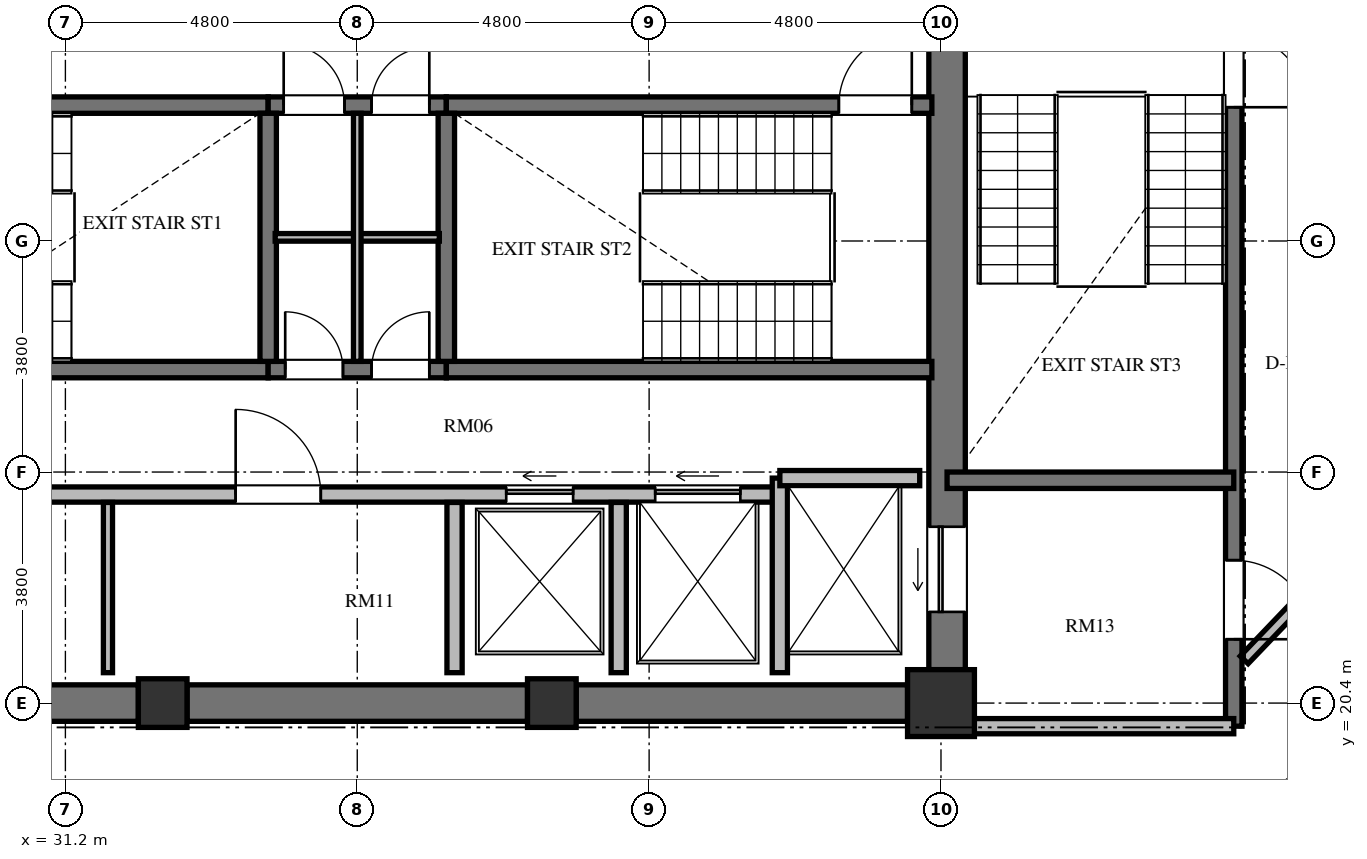
"""IFC4 building model, lengths in metres.
Left out: names, types, materials, properties, quantities, classifications, styles, units other than length and angle.
Written with IfcOpenShell. Run it as: python <this file> out.ifc"""

import sys

from ifc_helpers import new_model, si_unit, direction, frame, frame_2d, origin, origin_2d, place, context, subcontext, project, spatial, rectangle, extrude, element, fill, save


model = new_model("IFC4")
c1 = context("Model", 3, precision=1e-05, world=origin(), true_north=direction((0.0, 1.0)))
c2 = subcontext(c1, "Body", "Model", "MODEL_VIEW")
j1 = project(units=[si_unit("LENGTHUNIT", "METRE"), si_unit("PLANEANGLEUNIT", "RADIAN")], contexts=[c1])
p1 = place(None, origin())
s1 = spatial("IfcSite", under=j1, at=p1, CompositionType="ELEMENT")
p2 = place(p1, origin())
s2 = spatial("IfcBuilding", under=s1, at=p2, CompositionType="ELEMENT")
p3 = place(p2, frame((0.0, 0.0, 213.072)))
s3 = spatial("IfcBuildingStorey", under=s2, at=p3, CompositionType="ELEMENT", Elevation=213.072)
for number, where, z_axis, x_axis in (
    (1, (32.8, 20.4, 0.0), (0.0, 0.0, 1.0), (1.0, 0.0, 0.0)),
    (2, (39.2, 20.4, 0.0), (0.0, 0.0, 1.0), (1.0, 0.0, 0.0)),
):
    element("IfcColumn", number, at=place(p3, frame(where, z_axis=z_axis, x_axis=x_axis)), inside=s3, PredefinedType="COLUMN", context=c2, shape_type="SweptSolid", body=[
        extrude(rectangle(XDim=0.8, YDim=0.8, at=origin_2d()), origin(), (0.0, 0.0, 1.0), 3.648),
    ])
p4 = place(p3, frame((45.6, 20.4, 0.0), z_axis=(0.0, 0.0, 1.0), x_axis=(1.0, 0.0, 0.0)))
e3 = element("IfcColumn", 3, at=p4, inside=s3, PredefinedType="COLUMN", context=c2, shape_type="SweptSolid", body=[
    extrude(rectangle(XDim=1.1, YDim=1.1, at=origin_2d()), origin(), (0.0, 0.0, 1.0), 3.648),
])
p5 = place(p3, frame((45.7, 20.95, 0.0), z_axis=(0.0, 0.0, 1.0), x_axis=(0.0, 1.0, 0.0)))
e4 = element("IfcWall", 4, at=p5, inside=s3, PredefinedType="SHEAR", context=c2, shape_type="SweptSolid", body=[
    extrude(rectangle(XDim=14.1, YDim=0.6, at=frame_2d((7.05, 0.0))), origin(), (0.0, 0.0, 1.0), 3.648),
])
p6 = place(p5, frame((11.75, 0.0, 0.0)))
e5 = element("IfcOpeningElement", 5, at=p6, cuts=e4, PredefinedType="OPENING", context=c2, shape_type="SweptSolid", body=[
    extrude(rectangle(XDim=1.4, YDim=2.3, at=frame_2d((0.7, 1.15))), frame((0.0, 0.31, 0.0), z_axis=(0.0, -1.0, 0.0), x_axis=(1.0, 0.0, 0.0)), (0.0, 0.0, 1.0), 0.62),
])
p7 = place(p5, frame((0.95, 0.0, 0.0)))
e6 = element("IfcOpeningElement", 6, at=p7, cuts=e4, PredefinedType="OPENING", context=c2, shape_type="SweptSolid", body=[
    extrude(rectangle(XDim=1.4, YDim=2.3, at=frame_2d((0.7, 1.15))), frame((0.0, 0.31, 0.0), z_axis=(0.0, -1.0, 0.0), x_axis=(1.0, 0.0, 0.0)), (0.0, 0.0, 1.0), 0.62),
])
p8 = place(p3, frame((26.95, 20.4, 0.0), z_axis=(0.0, 0.0, 1.0), x_axis=(1.0, 0.0, 0.0)))
e7 = element("IfcWall", 7, at=p8, inside=s3, PredefinedType="SHEAR", context=c2, shape_type="SweptSolid", body=[
    extrude(rectangle(XDim=5.45, YDim=0.6, at=frame_2d((2.725, 0.0))), origin(), (0.0, 0.0, 1.0), 3.648),
])
p9 = place(p3, frame((33.2, 20.4, 0.0), z_axis=(0.0, 0.0, 1.0), x_axis=(1.0, 0.0, 0.0)))
e8 = element("IfcWall", 8, at=p9, inside=s3, PredefinedType="SHEAR", context=c2, shape_type="SweptSolid", body=[
    extrude(rectangle(XDim=5.6, YDim=0.6, at=frame_2d((2.8, 0.0))), origin(), (0.0, 0.0, 1.0), 3.648),
])
p10 = place(p3, frame((39.6, 20.4, 0.0), z_axis=(0.0, 0.0, 1.0), x_axis=(1.0, 0.0, 0.0)))
e9 = element("IfcWall", 9, at=p10, inside=s3, PredefinedType="SHEAR", context=c2, shape_type="SweptSolid", body=[
    extrude(rectangle(XDim=5.45, YDim=0.6, at=frame_2d((2.725, 0.0))), origin(), (0.0, 0.0, 1.0), 3.648),
])
p11 = place(p3, frame((26.55, 30.235, 0.0), z_axis=(0.0, 0.0, 1.0), x_axis=(1.0, 0.0, 0.0)))
e10 = element("IfcWall", 10, at=p11, inside=s3, PredefinedType="SHEAR", context=c2, shape_type="SweptSolid", body=[
    extrude(rectangle(XDim=7.985, YDim=0.27, at=frame_2d((3.992, 0.0))), origin(), (0.0, 0.0, 1.0), 3.648),
])
p12 = place(p3, frame((34.535, 30.235, 0.0), z_axis=(0.0, 0.0, 1.0), x_axis=(1.0, 0.0, 0.0)))
e11 = element("IfcWall", 11, at=p12, inside=s3, PredefinedType="SHEAR", context=c2, shape_type="SweptSolid", body=[
    extrude(rectangle(XDim=2.93, YDim=0.27, at=frame_2d((1.465, 0.0))), origin(), (0.0, 0.0, 1.0), 3.648),
])
p13 = place(p12, frame((0.255, 0.0, 0.0)))
e12 = element("IfcOpeningElement", 12, at=p13, cuts=e11, PredefinedType="OPENING", context=c2, shape_type="SweptSolid", body=[
    extrude(rectangle(XDim=1.0, YDim=2.1, at=frame_2d((0.5, 1.05))), frame((0.0, 0.145, 0.0), z_axis=(0.0, -1.0, 0.0), x_axis=(1.0, 0.0, 0.0)), (0.0, 0.0, 1.0), 0.29),
])
p14 = place(p12, frame((1.7, 0.0, 0.0)))
e13 = element("IfcOpeningElement", 13, at=p14, cuts=e11, PredefinedType="OPENING", context=c2, shape_type="SweptSolid", body=[
    extrude(rectangle(XDim=0.95, YDim=2.1, at=frame_2d((0.475, 1.05))), frame((0.0, 0.145, 0.0), z_axis=(0.0, -1.0, 0.0), x_axis=(1.0, 0.0, 0.0)), (0.0, 0.0, 1.0), 0.29),
])
p15 = place(p3, frame((37.465, 30.235, 0.0), z_axis=(0.0, 0.0, 1.0), x_axis=(1.0, 0.0, 0.0)))
e14 = element("IfcWall", 14, at=p15, inside=s3, PredefinedType="SHEAR", context=c2, shape_type="SweptSolid", body=[
    extrude(rectangle(XDim=7.985, YDim=0.27, at=frame_2d((3.992, 0.0))), origin(), (0.0, 0.0, 1.0), 3.648),
])
p16 = place(p15, frame((6.455, 0.0, 0.0)))
e15 = element("IfcOpeningElement", 15, at=p16, cuts=e14, PredefinedType="OPENING", context=c2, shape_type="SweptSolid", body=[
    extrude(rectangle(XDim=1.2, YDim=2.15, at=frame_2d((0.6, 1.075))), frame((0.0, 0.145, 0.0), z_axis=(0.0, -1.0, 0.0), x_axis=(1.0, 0.0, 0.0)), (0.0, 0.0, 1.0), 0.29),
])
p17 = place(p3, frame((26.55, 25.885, 0.0), z_axis=(0.0, 0.0, 1.0), x_axis=(1.0, 0.0, 0.0)))
e16 = element("IfcWall", 16, at=p17, inside=s3, PredefinedType="SHEAR", context=c2, shape_type="SweptSolid", body=[
    extrude(rectangle(XDim=7.985, YDim=0.27, at=frame_2d((3.992, 0.0))), origin(), (0.0, 0.0, 1.0), 3.648),
])
p18 = place(p3, frame((34.535, 25.885, 0.0), z_axis=(0.0, 0.0, 1.0), x_axis=(1.0, 0.0, 0.0)))
e17 = element("IfcWall", 17, at=p18, inside=s3, PredefinedType="SHEAR", context=c2, shape_type="SweptSolid", body=[
    extrude(rectangle(XDim=2.93, YDim=0.27, at=frame_2d((1.465, 0.0))), origin(), (0.0, 0.0, 1.0), 3.648),
])
p19 = place(p18, frame((0.28, 0.0, 0.0)))
e18 = element("IfcOpeningElement", 18, at=p19, cuts=e17, PredefinedType="OPENING", context=c2, shape_type="SweptSolid", body=[
    extrude(rectangle(XDim=0.95, YDim=2.1, at=frame_2d((0.475, 1.05))), frame((0.0, 0.145, 0.0), z_axis=(0.0, -1.0, 0.0), x_axis=(1.0, 0.0, 0.0)), (0.0, 0.0, 1.0), 0.29),
])
p20 = place(p18, frame((1.7, 0.0, 0.0)))
e19 = element("IfcOpeningElement", 19, at=p20, cuts=e17, PredefinedType="OPENING", context=c2, shape_type="SweptSolid", body=[
    extrude(rectangle(XDim=0.95, YDim=2.1, at=frame_2d((0.475, 1.05))), frame((0.0, 0.145, 0.0), z_axis=(0.0, -1.0, 0.0), x_axis=(1.0, 0.0, 0.0)), (0.0, 0.0, 1.0), 0.29),
])
p21 = place(p3, frame((37.465, 25.885, 0.0), z_axis=(0.0, 0.0, 1.0), x_axis=(1.0, 0.0, 0.0)))
e20 = element("IfcWall", 20, at=p21, inside=s3, PredefinedType="SHEAR", context=c2, shape_type="SweptSolid", body=[
    extrude(rectangle(XDim=7.985, YDim=0.27, at=frame_2d((3.992, 0.0))), origin(), (0.0, 0.0, 1.0), 3.648),
])
for number, where, z_axis, x_axis in (
    (21, (34.535, 26.02, 0.0), (0.0, 0.0, 1.0), (0.0, 1.0, 0.0)),
    (22, (37.465, 26.02, 0.0), (0.0, 0.0, 1.0), (0.0, 1.0, 0.0)),
):
    element("IfcWall", number, at=place(p3, frame(where, z_axis=z_axis, x_axis=x_axis)), inside=s3, PredefinedType="SHEAR", context=c2, shape_type="SweptSolid", body=[
        extrude(rectangle(XDim=4.08, YDim=0.27, at=frame_2d((2.04, 0.0))), origin(), (0.0, 0.0, 1.0), 3.648),
    ])
p22 = place(p3, frame((34.65, 28.06, 0.0), z_axis=(0.0, 0.0, 1.0), x_axis=(1.0, 0.0, 0.0)))
e23 = element("IfcWall", 23, at=p22, inside=s3, PredefinedType="PARTITIONING", context=c2, shape_type="SweptSolid", body=[
    extrude(rectangle(XDim=2.7, YDim=0.125, at=frame_2d((1.35, 0.0))), origin(), (0.0, 0.0, 1.0), 3.448),
])
p23 = place(p3, frame((36.0, 26.02, 0.0), z_axis=(0.0, 0.0, 1.0), x_axis=(0.0, 1.0, 0.0)))
e24 = element("IfcWall", 24, at=p23, inside=s3, PredefinedType="PARTITIONING", context=c2, shape_type="SweptSolid", body=[
    extrude(rectangle(XDim=4.08, YDim=0.125, at=frame_2d((2.04, 0.0))), origin(), (0.0, 0.0, 1.0), 3.448),
])
p24 = place(p3, frame((26.75, 23.83, 0.0), z_axis=(0.0, 0.0, 1.0), x_axis=(1.0, 0.0, 0.0)))
e25 = element("IfcWall", 25, at=p24, inside=s3, PredefinedType="SOLIDWALL", context=c2, shape_type="SweptSolid", body=[
    extrude(rectangle(XDim=16.2, YDim=0.25, at=frame_2d((8.1, 0.0))), origin(), (0.0, 0.0, 1.0), 3.448),
])
p25 = place(p24, frame((2.025, 0.0, 0.0)))
e26 = element("IfcOpeningElement", 26, at=p25, cuts=e25, PredefinedType="OPENING", context=c2, shape_type="SweptSolid", body=[
    extrude(rectangle(XDim=1.05, YDim=2.15, at=frame_2d((0.525, 1.075))), frame((0.0, 0.135, 0.0), z_axis=(0.0, -1.0, 0.0), x_axis=(1.0, 0.0, 0.0)), (0.0, 0.0, 1.0), 0.27),
])
p26 = place(p24, frame((7.25, 0.0, 0.0)))
e27 = element("IfcOpeningElement", 27, at=p26, cuts=e25, PredefinedType="OPENING", context=c2, shape_type="SweptSolid", body=[
    extrude(rectangle(XDim=1.4, YDim=2.2, at=frame_2d((0.7, 1.1))), frame((0.0, 0.135, 0.0), z_axis=(0.0, -1.0, 0.0), x_axis=(1.0, 0.0, 0.0)), (0.0, 0.0, 1.0), 0.27),
])
p27 = place(p24, frame((11.7, 0.0, 0.0)))
e28 = element("IfcOpeningElement", 28, at=p27, cuts=e25, PredefinedType="OPENING", context=c2, shape_type="SweptSolid", body=[
    extrude(rectangle(XDim=1.1, YDim=2.2, at=frame_2d((0.55, 1.1))), frame((0.0, 0.135, 0.0), z_axis=(0.0, -1.0, 0.0), x_axis=(1.0, 0.0, 0.0)), (0.0, 0.0, 1.0), 0.27),
])
p28 = place(p24, frame((14.15, 0.0, 0.0)))
e29 = element("IfcOpeningElement", 29, at=p28, cuts=e25, PredefinedType="OPENING", context=c2, shape_type="SweptSolid", body=[
    extrude(rectangle(XDim=1.4, YDim=2.3, at=frame_2d((0.7, 1.15))), frame((0.0, 0.135, 0.0), z_axis=(0.0, -1.0, 0.0), x_axis=(1.0, 0.0, 0.0)), (0.0, 0.0, 1.0), 0.27),
])
p29 = place(p3, frame((42.95, 20.9, 0.0), z_axis=(0.0, 0.0, 1.0), x_axis=(0.0, 1.0, 0.0)))
e30 = element("IfcWall", 30, at=p29, inside=s3, PredefinedType="SOLIDWALL", context=c2, shape_type="SweptSolid", body=[
    extrude(rectangle(XDim=3.2, YDim=0.25, at=frame_2d((1.6, 0.0))), origin(), (0.0, 0.0, 1.0), 3.448),
])
p30 = place(p3, frame((42.95, 24.1, 0.0), z_axis=(0.0, 0.0, 1.0), x_axis=(1.0, 0.0, 0.0)))
e31 = element("IfcWall", 31, at=p30, inside=s3, PredefinedType="SOLIDWALL", context=c2, shape_type="SweptSolid", body=[
    extrude(rectangle(XDim=2.3, YDim=0.25, at=frame_2d((1.15, 0.0))), origin(), (0.0, 0.0, 1.0), 3.448),
])
for number, where, z_axis, x_axis in (
    (32, (37.6, 20.9, 0.0), (0.0, 0.0, 1.0), (0.0, 1.0, 0.0)),
    (33, (40.3, 20.9, 0.0), (0.0, 0.0, 1.0), (0.0, 1.0, 0.0)),
):
    element("IfcWall", number, at=place(p3, frame(where, z_axis=z_axis, x_axis=x_axis)), inside=s3, PredefinedType="SOLIDWALL", context=c2, shape_type="SweptSolid", body=[
        extrude(rectangle(XDim=2.8, YDim=0.25, at=frame_2d((1.4, 0.0))), origin(), (0.0, 0.0, 1.0), 3.448),
    ])
p31 = place(p3, frame((31.9, 20.9, 0.0), z_axis=(0.0, 0.0, 1.0), x_axis=(0.0, 1.0, 0.0)))
e34 = element("IfcWall", 34, at=p31, inside=s3, PredefinedType="PARTITIONING", context=c2, shape_type="SweptSolid", body=[
    extrude(rectangle(XDim=2.8, YDim=0.15, at=frame_2d((1.4, 0.0))), origin(), (0.0, 0.0, 1.0), 3.448),
])
p32 = place(p3, frame((50.415, 35.845, 0.0), z_axis=(0.0, 0.0, 1.0), x_axis=(0.0, -1.0, 0.0)))
e35 = element("IfcWall", 35, at=p32, inside=s3, PredefinedType="SHEAR", context=c2, shape_type="SweptSolid", body=[
    extrude(rectangle(XDim=15.825, YDim=0.27, at=frame_2d((7.913, 0.0))), origin(), (0.0, 0.0, 1.0), 3.648),
])
p33 = place(p32, frame((4.445, 0.0, 0.0)))
e36 = element("IfcOpeningElement", 36, at=p33, cuts=e35, PredefinedType="OPENING", context=c2, shape_type="SweptSolid", body=[
    extrude(rectangle(XDim=1.2, YDim=2.15, at=frame_2d((0.6, 1.075))), frame((0.0, 0.145, 0.0), z_axis=(0.0, -1.0, 0.0), x_axis=(1.0, 0.0, 0.0)), (0.0, 0.0, 1.0), 0.29),
])
p34 = place(p32, frame((1.295, 0.0, 0.0)))
e37 = element("IfcOpeningElement", 37, at=p34, cuts=e35, PredefinedType="OPENING", context=c2, shape_type="SweptSolid", body=[
    extrude(rectangle(XDim=1.3, YDim=2.2, at=frame_2d((0.65, 1.1))), frame((0.0, 0.145, 0.0), z_axis=(0.0, -1.0, 0.0), x_axis=(1.0, 0.0, 0.0)), (0.0, 0.0, 1.0), 0.29),
])
p35 = place(p32, frame((13.095, 0.0, 0.0)))
e38 = element("IfcOpeningElement", 38, at=p35, cuts=e35, PredefinedType="OPENING", context=c2, shape_type="SweptSolid", body=[
    extrude(rectangle(XDim=1.3, YDim=2.2, at=frame_2d((0.65, 1.1))), frame((0.0, 0.145, 0.0), z_axis=(0.0, -1.0, 0.0), x_axis=(1.0, 0.0, 0.0)), (0.0, 0.0, 1.0), 0.29),
])
p36 = place(p3, frame((45.7, 24.065, 0.0), z_axis=(0.0, 0.0, 1.0), x_axis=(1.0, 0.0, 0.0)))
e39 = element("IfcWall", 39, at=p36, inside=s3, PredefinedType="SHEAR", context=c2, shape_type="SweptSolid", body=[
    extrude(rectangle(XDim=4.715, YDim=0.27, at=frame_2d((2.357, 0.0))), origin(), (0.0, 0.0, 1.0), 3.648),
])
p37 = place(p3, frame((45.7, 20.02, 0.0), z_axis=(0.0, 0.0, 1.0), x_axis=(1.0, 0.0, 0.0)))
e40 = element("IfcWall", 40, at=p37, inside=s3, PredefinedType="SOLIDWALL", context=c2, shape_type="SweptSolid", body=[
    extrude(rectangle(XDim=4.715, YDim=0.25, at=frame_2d((2.357, 0.0))), origin(), (0.0, 0.0, 1.0), 3.448),
])
p38 = place(p3, frame((53.078, 23.714, 0.0), z_axis=(0.0, 0.0, 1.0), x_axis=(-0.691353379446, -0.722516785085, 0.0)))
e41 = element("IfcWall", 41, at=p38, inside=s3, PredefinedType="PARTITIONING", context=c2, shape_type="SweptSolid", body=[
    extrude(rectangle(XDim=3.604, YDim=0.18, at=frame_2d((1.802, 0.0))), origin(), (0.0, 0.0, 1.0), 3.448),
])
p39 = place(p16, origin())
e42 = element("IfcDoor", 42, at=p39, inside=s3, OperationType="SINGLE_SWING_RIGHT", PredefinedType="DOOR", context=c2, shape_type="SweptSolid", body=[
    extrude(rectangle(XDim=1.2, YDim=2.15, at=frame_2d((0.6, 1.075))), frame((0.0, 0.025, 0.0), z_axis=(0.0, -1.0, 0.0), x_axis=(1.0, 0.0, 0.0)), (0.0, 0.0, 1.0), 0.05),
])
fill(e15, e42)
p40 = place(p19, origin())
e43 = element("IfcDoor", 43, at=p40, inside=s3, OperationType="SINGLE_SWING_LEFT", PredefinedType="DOOR", context=c2, shape_type="SweptSolid", body=[
    extrude(rectangle(XDim=0.95, YDim=2.1, at=frame_2d((0.475, 1.05))), frame((0.0, 0.025, 0.0), z_axis=(0.0, -1.0, 0.0), x_axis=(1.0, 0.0, 0.0)), (0.0, 0.0, 1.0), 0.05),
])
fill(e18, e43)
p41 = place(p20, origin())
e44 = element("IfcDoor", 44, at=p41, inside=s3, OperationType="SINGLE_SWING_RIGHT", PredefinedType="DOOR", context=c2, shape_type="SweptSolid", body=[
    extrude(rectangle(XDim=0.95, YDim=2.1, at=frame_2d((0.475, 1.05))), frame((0.0, 0.025, 0.0), z_axis=(0.0, -1.0, 0.0), x_axis=(1.0, 0.0, 0.0)), (0.0, 0.0, 1.0), 0.05),
])
fill(e19, e44)
p42 = place(p13, origin())
e45 = element("IfcDoor", 45, at=p42, inside=s3, OperationType="SINGLE_SWING_LEFT", PredefinedType="DOOR", context=c2, shape_type="SweptSolid", body=[
    extrude(rectangle(XDim=1.0, YDim=2.1, at=frame_2d((0.5, 1.05))), frame((0.0, 0.025, 0.0), z_axis=(0.0, -1.0, 0.0), x_axis=(1.0, 0.0, 0.0)), (0.0, 0.0, 1.0), 0.05),
])
fill(e12, e45)
p43 = place(p14, origin())
e46 = element("IfcDoor", 46, at=p43, inside=s3, OperationType="SINGLE_SWING_RIGHT", PredefinedType="DOOR", context=c2, shape_type="SweptSolid", body=[
    extrude(rectangle(XDim=0.95, YDim=2.1, at=frame_2d((0.475, 1.05))), frame((0.0, 0.025, 0.0), z_axis=(0.0, -1.0, 0.0), x_axis=(1.0, 0.0, 0.0)), (0.0, 0.0, 1.0), 0.05),
])
fill(e13, e46)
p44 = place(p26, origin())
e47 = element("IfcDoor", 47, at=p44, inside=s3, OperationType="SINGLE_SWING_LEFT", PredefinedType="DOOR", context=c2, shape_type="SweptSolid", body=[
    extrude(rectangle(XDim=1.4, YDim=2.2, at=frame_2d((0.7, 1.1))), frame((0.0, 0.025, 0.0), z_axis=(0.0, -1.0, 0.0), x_axis=(1.0, 0.0, 0.0)), (0.0, 0.0, 1.0), 0.05),
])
fill(e27, e47)
p45 = place(p27, origin())
e48 = element("IfcDoor", 48, at=p45, inside=s3, OperationType="SLIDING_TO_LEFT", PredefinedType="DOOR", context=c2, shape_type="SweptSolid", body=[
    extrude(rectangle(XDim=1.1, YDim=2.2, at=frame_2d((0.55, 1.1))), frame((0.0, 0.025, 0.0), z_axis=(0.0, -1.0, 0.0), x_axis=(1.0, 0.0, 0.0)), (0.0, 0.0, 1.0), 0.05),
])
fill(e28, e48)
p46 = place(p7, origin())
e49 = element("IfcDoor", 49, at=p46, inside=s3, OperationType="SLIDING_TO_LEFT", PredefinedType="DOOR", context=c2, shape_type="SweptSolid", body=[
    extrude(rectangle(XDim=1.4, YDim=2.3, at=frame_2d((0.7, 1.15))), frame((0.0, 0.025, 0.0), z_axis=(0.0, -1.0, 0.0), x_axis=(1.0, 0.0, 0.0)), (0.0, 0.0, 1.0), 0.05),
])
fill(e6, e49)
p47 = place(p28, origin())
e50 = element("IfcDoor", 50, at=p47, inside=s3, OperationType="SLIDING_TO_LEFT", PredefinedType="DOOR", context=c2, shape_type="SweptSolid", body=[
    extrude(rectangle(XDim=1.4, YDim=2.3, at=frame_2d((0.7, 1.15))), frame((0.0, 0.025, 0.0), z_axis=(0.0, -1.0, 0.0), x_axis=(1.0, 0.0, 0.0)), (0.0, 0.0, 1.0), 0.05),
])
fill(e29, e50)
p48 = place(p33, origin())
e51 = element("IfcDoor", 51, at=p48, inside=s3, OperationType="SINGLE_SWING_RIGHT", PredefinedType="DOOR", context=c2, shape_type="SweptSolid", body=[
    extrude(rectangle(XDim=1.2, YDim=2.15, at=frame_2d((0.6, 1.075))), frame((0.0, 0.025, 0.0), z_axis=(0.0, -1.0, 0.0), x_axis=(1.0, 0.0, 0.0)), (0.0, 0.0, 1.0), 0.05),
])
fill(e36, e51)
p49 = place(p35, origin())
e52 = element("IfcDoor", 52, at=p49, inside=s3, OperationType="SINGLE_SWING_RIGHT", PredefinedType="DOOR", context=c2, shape_type="SweptSolid", body=[
    extrude(rectangle(XDim=1.3, YDim=2.2, at=frame_2d((0.65, 1.1))), frame((0.0, 0.025, 0.0), z_axis=(0.0, -1.0, 0.0), x_axis=(1.0, 0.0, 0.0)), (0.0, 0.0, 1.0), 0.05),
])
fill(e38, e52)
save(model, sys.argv[1])
